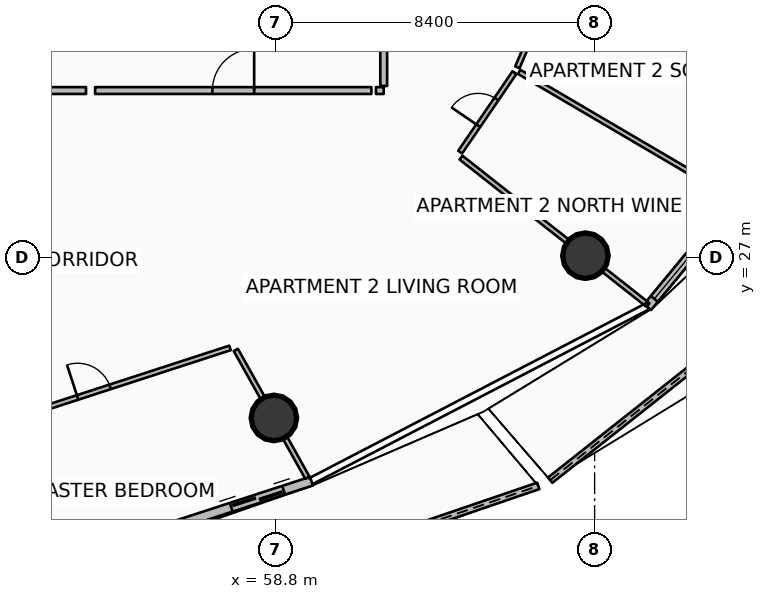
"""IFC4 building model, lengths in metres.
Left out: names, types, materials, properties, quantities, classifications, styles, units other than length and angle.
Written with IfcOpenShell. Run it as: python <this file> out.ifc"""

import sys

from ifc_helpers import new_model, si_unit, direction, frame, frame_2d, origin, origin_2d, place, context, subcontext, project, spatial, polyline, rectangle, circle, outline, extrude, element, fill, save


model = new_model("IFC4")
c1 = context("Model", 3, precision=1e-05, world=origin(), true_north=direction((0.0, 1.0)))
c2 = subcontext(c1, "Body", "Model", "MODEL_VIEW")
j1 = project(units=[si_unit("LENGTHUNIT", "METRE"), si_unit("PLANEANGLEUNIT", "RADIAN")], contexts=[c1])
p1 = place(None, origin())
s1 = spatial("IfcSite", under=j1, at=p1, CompositionType="ELEMENT")
p2 = place(p1, origin())
s2 = spatial("IfcBuilding", under=s1, at=p2, CompositionType="ELEMENT")
p3 = place(p2, frame((0.0, 0.0, 93.9)))
s3 = spatial("IfcBuildingStorey", under=s2, at=p3, CompositionType="ELEMENT", Elevation=93.9)
for number, where, z_axis, x_axis in (
    (1, (58.76, 22.786, 0.0), (0.0, 0.0, 1.0), (1.0, 0.0, 0.0)),
    (2, (66.958, 27.055, 0.0), (0.0, 0.0, 1.0), (1.0, 0.0, 0.0)),
):
    element("IfcColumn", number, at=place(p3, frame(where, z_axis=z_axis, x_axis=x_axis)), inside=s3, PredefinedType="COLUMN", context=c2, shape_type="SweptSolid", body=[
        extrude(circle(Radius=0.6, at=origin_2d()), origin(), (0.0, 0.0, 1.0), 3.5),
    ])
p4 = place(p3, frame((56.025, 17.689, 0.0), z_axis=(0.0, 0.0, 1.0), x_axis=(0.94637474678, 0.323070949881, 0.0)))
e3 = element("IfcWall", 3, at=p4, inside=s3, PredefinedType="PARAPET", context=c2, shape_type="SweptSolid", body=[
    extrude(outline(polyline([(0.0, 0.0), (10.241, 0.0), (10.241, 1.747), (5.121, 1.562), (0.0, 1.348), (0.0, 0.0)])), frame((0.0, 0.09, 0.0), z_axis=(0.0, -1.0, 0.0), x_axis=(1.0, 0.0, 0.0)), (0.0, 0.0, 1.0), 0.18),
])
p5 = place(p3, frame((66.031, 21.148, 0.0), z_axis=(0.0, 0.0, 1.0), x_axis=(0.784321358075, 0.620354743084, 0.0)))
e4 = element("IfcWall", 4, at=p5, inside=s3, PredefinedType="PARAPET", context=c2, shape_type="SweptSolid", body=[
    extrude(outline(polyline([(0.0, 0.0), (11.316, 0.0), (11.316, 1.832), (5.658, 1.853), (0.0, 1.756), (0.0, 0.0)])), frame((0.0, 0.09, 0.0), z_axis=(0.0, -1.0, 0.0), x_axis=(1.0, 0.0, 0.0)), (0.0, 0.0, 1.0), 0.18),
])
p6 = place(p3, frame((50.767, 18.203, 0.0), z_axis=(0.0, 0.0, 1.0), x_axis=(0.951052494852, 0.30902937083, 0.0)))
e5 = element("IfcWall", 5, at=p6, inside=s3, PredefinedType="SOLIDWALL", context=c2, shape_type="SweptSolid", body=[
    extrude(rectangle(XDim=9.444, YDim=0.24, at=frame_2d((4.722, 0.0))), origin(), (0.0, 0.0, 1.0), 2.45),
])
p7 = place(p6, frame((7.224, 0.0, 0.0)))
e6 = element("IfcOpeningElement", 6, at=p7, cuts=e5, PredefinedType="OPENING", context=c2, shape_type="SweptSolid", body=[
    extrude(rectangle(XDim=1.45, YDim=2.15, at=frame_2d((0.725, 1.075))), frame((0.0, 0.13, 0.0), z_axis=(0.0, -1.0, 0.0), x_axis=(1.0, 0.0, 0.0)), (0.0, 0.0, 1.0), 0.26),
])
p8 = place(p6, frame((0.28, 0.0, 0.65)))
e7 = element("IfcOpeningElement", 7, at=p8, cuts=e5, PredefinedType="OPENING", context=c2, shape_type="SweptSolid", body=[
    extrude(rectangle(XDim=1.6, YDim=1.5, at=frame_2d((0.8, 0.75))), frame((0.0, 0.13, 0.0), z_axis=(0.0, -1.0, 0.0), x_axis=(1.0, 0.0, 0.0)), (0.0, 0.0, 1.0), 0.26),
])
p9 = place(p3, frame((68.593, 25.702, 0.0), z_axis=(0.0, 0.0, 1.0), x_axis=(0.636704975, 0.771107498868, 0.0)))
e8 = element("IfcWall", 8, at=p9, inside=s3, PredefinedType="SOLIDWALL", context=c2, shape_type="SweptSolid", body=[
    extrude(rectangle(XDim=11.084, YDim=0.24, at=frame_2d((5.542, 0.0))), origin(), (0.0, 0.0, 1.0), 2.45),
])
p10 = place(p9, frame((8.864, 0.0, 0.0)))
e9 = element("IfcOpeningElement", 9, at=p10, cuts=e8, PredefinedType="OPENING", context=c2, shape_type="SweptSolid", body=[
    extrude(rectangle(XDim=1.45, YDim=2.15, at=frame_2d((0.725, 1.075))), frame((0.0, 0.13, 0.0), z_axis=(0.0, -1.0, 0.0), x_axis=(1.0, 0.0, 0.0)), (0.0, 0.0, 1.0), 0.26),
])
p11 = place(p9, frame((0.28, 0.0, 0.65)))
e10 = element("IfcOpeningElement", 10, at=p11, cuts=e8, PredefinedType="OPENING", context=c2, shape_type="SweptSolid", body=[
    extrude(rectangle(XDim=1.6, YDim=1.5, at=frame_2d((0.8, 0.75))), frame((0.0, 0.13, 0.0), z_axis=(0.0, -1.0, 0.0), x_axis=(1.0, 0.0, 0.0)), (0.0, 0.0, 1.0), 0.26),
])
p12 = place(p3, frame((54.056, 31.4, 0.0), z_axis=(0.0, 0.0, 1.0), x_axis=(1.0, 0.0, 0.0)))
e11 = element("IfcWall", 11, at=p12, inside=s3, PredefinedType="PARTITIONING", context=c2, shape_type="SweptSolid", body=[
    extrude(rectangle(XDim=7.27, YDim=0.18, at=frame_2d((3.635, 0.0))), origin(), (0.0, 0.0, 1.0), 2.94),
])
p13 = place(p12, frame((3.085, 0.0, 0.0)))
e12 = element("IfcOpeningElement", 12, at=p13, cuts=e11, PredefinedType="OPENING", context=c2, shape_type="SweptSolid", body=[
    extrude(rectangle(XDim=1.1, YDim=2.1, at=frame_2d((0.55, 1.05))), frame((0.0, 0.1, 0.0), z_axis=(0.0, -1.0, 0.0), x_axis=(1.0, 0.0, 0.0)), (0.0, 0.0, 1.0), 0.2),
])
p14 = place(p3, frame((49.375, 31.4, 0.0), z_axis=(0.0, 0.0, 1.0), x_axis=(1.0, 0.0, 0.0)))
e13 = element("IfcWall", 13, at=p14, inside=s3, PredefinedType="PARTITIONING", context=c2, shape_type="SweptSolid", body=[
    extrude(rectangle(XDim=4.442, YDim=0.18, at=frame_2d((2.221, 0.0))), origin(), (0.0, 0.0, 1.0), 2.94),
])
p15 = place(p3, frame((57.759, 24.575, 0.0), z_axis=(0.0, 0.0, 1.0), x_axis=(0.488595646066, -0.87251034071, 0.0)))
e14 = element("IfcWall", 14, at=p15, inside=s3, PredefinedType="PARTITIONING", context=c2, shape_type="SweptSolid", body=[
    extrude(rectangle(XDim=3.851, YDim=0.125, at=frame_2d((1.925, 0.0))), origin(), (0.0, 0.0, 1.0), 2.94),
])
p16 = place(p3, frame((50.44, 22.3, 0.0), z_axis=(0.0, 0.0, 1.0), x_axis=(0.951063594717, 0.308995208383, 0.0)))
e15 = element("IfcWall", 15, at=p16, inside=s3, PredefinedType="PARTITIONING", context=c2, shape_type="SweptSolid", body=[
    extrude(rectangle(XDim=7.534, YDim=0.125, at=frame_2d((3.767, 0.0))), origin(), (0.0, 0.0, 1.0), 2.94),
])
p17 = place(p16, frame((3.317, 0.0, 0.0)))
e16 = element("IfcOpeningElement", 16, at=p17, cuts=e15, PredefinedType="OPENING", context=c2, shape_type="SweptSolid", body=[
    extrude(rectangle(XDim=0.9, YDim=2.08, at=frame_2d((0.45, 1.04))), frame((0.0, 0.073, 0.0), z_axis=(0.0, -1.0, 0.0), x_axis=(1.0, 0.0, 0.0)), (0.0, 0.0, 1.0), 0.145),
])
p18 = place(p3, frame((61.446, 31.4, 0.0), z_axis=(0.0, 0.0, 1.0), x_axis=(1.0, 0.0, 0.0)))
e17 = element("IfcWall", 17, at=p18, inside=s3, PredefinedType="PARTITIONING", context=c2, shape_type="SweptSolid", body=[
    extrude(rectangle(XDim=0.204, YDim=0.18, at=frame_2d((0.102, 0.0))), origin(), (0.0, 0.0, 1.0), 2.94),
])
p19 = place(p3, frame((61.65, 31.52, 0.0), z_axis=(0.0, 0.0, 1.0), x_axis=(0.0, 1.0, 0.0)))
e18 = element("IfcWall", 18, at=p19, inside=s3, PredefinedType="PARTITIONING", context=c2, shape_type="SweptSolid", body=[
    extrude(rectangle(XDim=6.51, YDim=0.18, at=frame_2d((3.255, 0.0))), origin(), (0.0, 0.0, 1.0), 2.94),
])
p20 = place(p3, frame((63.684, 29.635, 0.0), z_axis=(0.0, 0.0, 1.0), x_axis=(0.785296487737, -0.619119880434, 0.0)))
e19 = element("IfcWall", 19, at=p20, inside=s3, PredefinedType="PARTITIONING", context=c2, shape_type="SweptSolid", body=[
    extrude(rectangle(XDim=6.266, YDim=0.125, at=frame_2d((3.133, 0.0))), origin(), (0.0, 0.0, 1.0), 2.94),
])
p21 = place(p3, frame((65.214, 31.893, 0.0), z_axis=(0.0, 0.0, 1.0), x_axis=(0.862328516234, -0.506349217527, 0.0)))
e20 = element("IfcWall", 20, at=p21, inside=s3, PredefinedType="PARTITIONING", context=c2, shape_type="SweptSolid", body=[
    extrude(rectangle(XDim=6.506, YDim=0.125, at=frame_2d((3.253, 0.0))), origin(), (0.0, 0.0, 1.0), 2.94),
])
p22 = place(p3, frame((63.662, 29.78, 0.0), z_axis=(0.0, 0.0, 1.0), x_axis=(0.56409306427, 0.825711217583, 0.0)))
e21 = element("IfcWall", 21, at=p22, inside=s3, PredefinedType="PARTITIONING", context=c2, shape_type="SweptSolid", body=[
    extrude(rectangle(XDim=2.534, YDim=0.125, at=frame_2d((1.267, 0.0))), origin(), (0.0, 0.0, 1.0), 2.94),
])
p23 = place(p22, frame((0.842, 0.0, 0.0)))
e22 = element("IfcOpeningElement", 22, at=p23, cuts=e21, PredefinedType="OPENING", context=c2, shape_type="SweptSolid", body=[
    extrude(rectangle(XDim=0.85, YDim=2.06, at=frame_2d((0.425, 1.03))), frame((0.0, 0.073, 0.0), z_axis=(0.0, -1.0, 0.0), x_axis=(1.0, 0.0, 0.0)), (0.0, 0.0, 1.0), 0.145),
])
p24 = place(p3, frame((65.168, 32.012, 0.0), z_axis=(0.0, 0.0, 1.0), x_axis=(0.392094288326, 0.91992503448, 0.0)))
e23 = element("IfcWall", 23, at=p24, inside=s3, PredefinedType="PARTITIONING", context=c2, shape_type="SweptSolid", body=[
    extrude(rectangle(XDim=4.894, YDim=0.125, at=frame_2d((2.447, 0.0))), origin(), (0.0, 0.0, 1.0), 2.94),
])
p25 = place(p24, frame((1.997, 0.0, 0.0)))
e24 = element("IfcOpeningElement", 24, at=p25, cuts=e23, PredefinedType="OPENING", context=c2, shape_type="SweptSolid", body=[
    extrude(rectangle(XDim=0.9, YDim=2.08, at=frame_2d((0.45, 1.04))), frame((0.0, 0.073, 0.0), z_axis=(0.0, -1.0, 0.0), x_axis=(1.0, 0.0, 0.0)), (0.0, 0.0, 1.0), 0.145),
])
p26 = place(p7, origin())
e25 = element("IfcDoor", 25, at=p26, inside=s3, OperationType="DOUBLE_DOOR_SLIDING", PredefinedType="DOOR", context=c2, shape_type="SweptSolid", body=[
    extrude(rectangle(XDim=1.45, YDim=2.15, at=frame_2d((0.725, 1.075))), frame((0.0, 0.025, 0.0), z_axis=(0.0, -1.0, 0.0), x_axis=(1.0, 0.0, 0.0)), (0.0, 0.0, 1.0), 0.05),
])
fill(e6, e25)
p27 = place(p11, origin())
e26 = element("IfcWindow", 26, at=p27, inside=s3, PartitioningType="SINGLE_PANEL", PredefinedType="WINDOW", context=c2, shape_type="SweptSolid", body=[
    extrude(rectangle(XDim=1.6, YDim=1.5, at=frame_2d((0.8, 0.75))), frame((0.0, 0.03, 0.0), z_axis=(0.0, -1.0, 0.0), x_axis=(1.0, 0.0, 0.0)), (0.0, 0.0, 1.0), 0.06),
])
fill(e10, e26)
p28 = place(p13, origin())
e27 = element("IfcDoor", 27, at=p28, inside=s3, OperationType="SINGLE_SWING_RIGHT", PredefinedType="DOOR", context=c2, shape_type="SweptSolid", body=[
    extrude(rectangle(XDim=1.1, YDim=2.1, at=frame_2d((0.55, 1.05))), frame((0.0, 0.025, 0.0), z_axis=(0.0, -1.0, 0.0), x_axis=(1.0, 0.0, 0.0)), (0.0, 0.0, 1.0), 0.05),
])
fill(e12, e27)
p29 = place(p17, origin())
e28 = element("IfcDoor", 28, at=p29, inside=s3, OperationType="SINGLE_SWING_LEFT", PredefinedType="DOOR", context=c2, shape_type="SweptSolid", body=[
    extrude(rectangle(XDim=0.9, YDim=2.08, at=frame_2d((0.45, 1.04))), frame((0.0, 0.025, 0.0), z_axis=(0.0, -1.0, 0.0), x_axis=(1.0, 0.0, 0.0)), (0.0, 0.0, 1.0), 0.05),
])
fill(e16, e28)
p30 = place(p23, origin())
e29 = element("IfcDoor", 29, at=p30, inside=s3, OperationType="SINGLE_SWING_LEFT", PredefinedType="DOOR", context=c2, shape_type="SweptSolid", body=[
    extrude(rectangle(XDim=0.85, YDim=2.06, at=frame_2d((0.425, 1.03))), frame((0.0, 0.025, 0.0), z_axis=(0.0, -1.0, 0.0), x_axis=(1.0, 0.0, 0.0)), (0.0, 0.0, 1.0), 0.05),
])
fill(e22, e29)
save(model, sys.argv[1])
